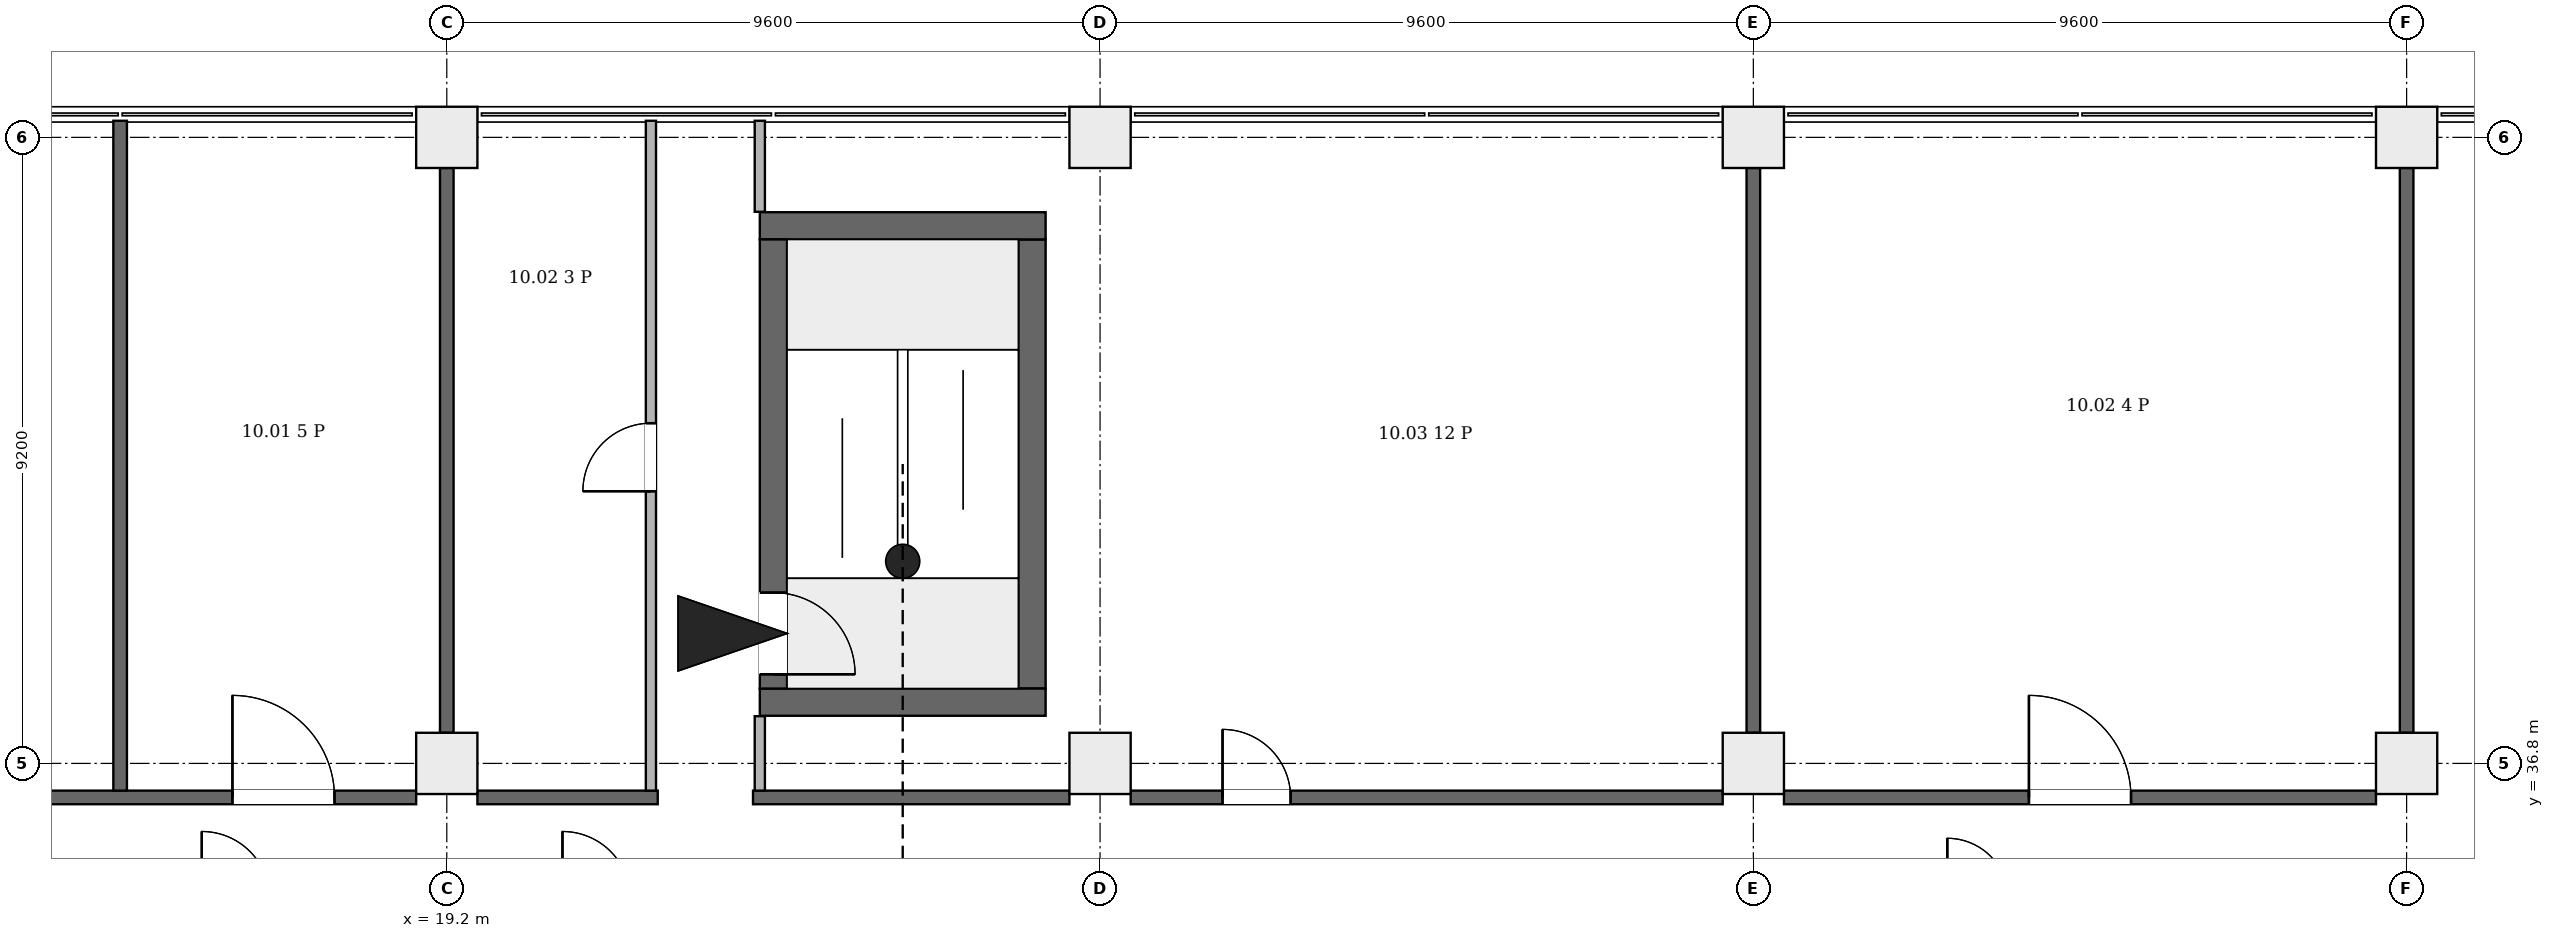
"""IFC4 building model, lengths in metres.
Left out: names, types, materials, properties, quantities, classifications, styles, units other than length and angle.
Written with IfcOpenShell. Run it as: python <this file> out.ifc"""

import sys

from ifc_helpers import new_model, si_unit, direction, frame, frame_2d, origin, origin_2d, place, context, subcontext, project, spatial, rectangle, extrude, element, fill, save


model = new_model("IFC4")
c1 = context("Model", 3, precision=1e-05, world=origin(), true_north=direction((0.0, 1.0)))
c2 = subcontext(c1, "Body", "Model", "MODEL_VIEW")
j1 = project(units=[si_unit("LENGTHUNIT", "METRE"), si_unit("PLANEANGLEUNIT", "RADIAN")], contexts=[c1])
p1 = place(None, origin())
s1 = spatial("IfcSite", under=j1, at=p1, CompositionType="ELEMENT")
p2 = place(p1, origin())
s2 = spatial("IfcBuilding", under=s1, at=p2, CompositionType="ELEMENT")
p3 = place(p2, frame((0.0, 0.0, 52.9)))
s3 = spatial("IfcBuildingStorey", under=s2, at=p3, CompositionType="ELEMENT", Elevation=52.9)
for number, where, z_axis, x_axis in (
    (1, (23.8, 37.7, 0.0), (0.0, 0.0, 1.0), (1.0, 0.0, 0.0)),
    (2, (23.8, 44.7, 0.0), (0.0, 0.0, 1.0), (1.0, 0.0, 0.0)),
):
    element("IfcWall", number, at=place(p3, frame(where, z_axis=z_axis, x_axis=x_axis)), inside=s3, PredefinedType="SHEAR", context=c2, shape_type="SweptSolid", body=[
        extrude(rectangle(XDim=4.2, YDim=0.4, at=frame_2d((2.1, 0.0))), origin(), (0.0, 0.0, 1.0), 4.2),
    ])
p4 = place(p3, frame((24.0, 37.9, 0.0), z_axis=(0.0, 0.0, 1.0), x_axis=(0.0, 1.0, 0.0)))
e3 = element("IfcWall", 3, at=p4, inside=s3, PredefinedType="SHEAR", context=c2, shape_type="SweptSolid", body=[
    extrude(rectangle(XDim=6.6, YDim=0.4, at=frame_2d((3.3, 0.0))), origin(), (0.0, 0.0, 1.0), 4.2),
])
p5 = place(p4, frame((0.21, 0.0, 0.0)))
e4 = element("IfcOpeningElement", 4, at=p5, cuts=e3, PredefinedType="OPENING", context=c2, shape_type="SweptSolid", body=[
    extrude(rectangle(XDim=1.2, YDim=2.1, at=frame_2d((0.6, 1.05))), frame((0.0, 0.21, 0.0), z_axis=(0.0, -1.0, 0.0), x_axis=(1.0, 0.0, 0.0)), (0.0, 0.0, 1.0), 0.42),
])
p6 = place(p3, frame((27.8, 37.9, 0.0), z_axis=(0.0, 0.0, 1.0), x_axis=(0.0, 1.0, 0.0)))
e5 = element("IfcWall", 5, at=p6, inside=s3, PredefinedType="SHEAR", context=c2, shape_type="SweptSolid", body=[
    extrude(rectangle(XDim=6.6, YDim=0.4, at=frame_2d((3.3, 0.0))), origin(), (0.0, 0.0, 1.0), 4.2),
])
for number, where, z_axis, x_axis in (
    (6, (19.2, 36.8, 0.0), (0.0, 0.0, 1.0), (1.0, 0.0, 0.0)),
    (7, (28.8, 36.8, 0.0), (0.0, 0.0, 1.0), (1.0, 0.0, 0.0)),
    (8, (38.4, 36.8, 0.0), (0.0, 0.0, 1.0), (1.0, 0.0, 0.0)),
    (9, (48.0, 36.8, 0.0), (0.0, 0.0, 1.0), (1.0, 0.0, 0.0)),
    (10, (19.2, 46.0, 0.0), (0.0, 0.0, 1.0), (1.0, 0.0, 0.0)),
    (11, (28.8, 46.0, 0.0), (0.0, 0.0, 1.0), (1.0, 0.0, 0.0)),
    (12, (38.4, 46.0, 0.0), (0.0, 0.0, 1.0), (1.0, 0.0, 0.0)),
    (13, (48.0, 46.0, 0.0), (0.0, 0.0, 1.0), (1.0, 0.0, 0.0)),
):
    element("IfcColumn", number, at=place(p3, frame(where, z_axis=z_axis, x_axis=x_axis)), inside=s3, PredefinedType="COLUMN", context=c2, shape_type="SweptSolid", body=[
        extrude(rectangle(XDim=0.9, YDim=0.9, at=origin_2d()), origin(), (0.0, 0.0, 1.0), 4.2),
    ])
p7 = place(p3, frame((11.2, 36.3, 0.0), z_axis=(0.0, 0.0, 1.0), x_axis=(1.0, 0.0, 0.0)))
e14 = element("IfcWall", 14, at=p7, inside=s3, PredefinedType="PARTITIONING", context=c2, shape_type="SweptSolid", body=[
    extrude(rectangle(XDim=7.55, YDim=0.2, at=frame_2d((3.775, 0.0))), origin(), (0.0, 0.0, 1.0), 3.9),
])
p8 = place(p7, frame((4.85, 0.0, 0.0)))
e15 = element("IfcOpeningElement", 15, at=p8, cuts=e14, PredefinedType="OPENING", context=c2, shape_type="SweptSolid", body=[
    extrude(rectangle(XDim=1.5, YDim=2.1, at=frame_2d((0.75, 1.05))), frame((0.0, 0.11, 0.0), z_axis=(0.0, -1.0, 0.0), x_axis=(1.0, 0.0, 0.0)), (0.0, 0.0, 1.0), 0.22),
])
p9 = place(p3, frame((14.4, 36.4, 0.0), z_axis=(0.0, 0.0, 1.0), x_axis=(0.0, 1.0, 0.0)))
e16 = element("IfcWall", 16, at=p9, inside=s3, PredefinedType="PARTITIONING", context=c2, shape_type="SweptSolid", body=[
    extrude(rectangle(XDim=9.844, YDim=0.2, at=frame_2d((4.922, 0.0))), origin(), (0.0, 0.0, 1.0), 3.9),
])
p10 = place(p3, frame((19.2, 37.25, 0.0), z_axis=(0.0, 0.0, 1.0), x_axis=(0.0, 1.0, 0.0)))
e17 = element("IfcWall", 17, at=p10, inside=s3, PredefinedType="PARTITIONING", context=c2, shape_type="SweptSolid", body=[
    extrude(rectangle(XDim=8.3, YDim=0.2, at=frame_2d((4.15, 0.0))), origin(), (0.0, 0.0, 1.0), 3.9),
])
p11 = place(p3, frame((19.65, 36.3, 0.0), z_axis=(0.0, 0.0, 1.0), x_axis=(1.0, 0.0, 0.0)))
e18 = element("IfcWall", 18, at=p11, inside=s3, PredefinedType="PARTITIONING", context=c2, shape_type="SweptSolid", body=[
    extrude(rectangle(XDim=2.65, YDim=0.2, at=frame_2d((1.325, 0.0))), origin(), (0.0, 0.0, 1.0), 3.9),
])
p12 = place(p3, frame((22.2, 36.4, 0.0), z_axis=(0.0, 0.0, 1.0), x_axis=(0.0, 1.0, 0.0)))
e19 = element("IfcWall", 19, at=p12, inside=s3, PredefinedType="PARTITIONING", context=c2, shape_type="SweptSolid", body=[
    extrude(rectangle(XDim=9.844, YDim=0.15, at=frame_2d((4.922, 0.0))), origin(), (0.0, 0.0, 1.0), 3.9),
])
p13 = place(p12, frame((4.4, 0.0, 0.0)))
e20 = element("IfcOpeningElement", 20, at=p13, cuts=e19, PredefinedType="OPENING", context=c2, shape_type="SweptSolid", body=[
    extrude(rectangle(XDim=1.0, YDim=2.1, at=frame_2d((0.5, 1.05))), frame((0.0, 0.085, 0.0), z_axis=(0.0, -1.0, 0.0), x_axis=(1.0, 0.0, 0.0)), (0.0, 0.0, 1.0), 0.17),
])
p14 = place(p3, frame((23.7, 36.3, 0.0), z_axis=(0.0, 0.0, 1.0), x_axis=(1.0, 0.0, 0.0)))
e21 = element("IfcWall", 21, at=p14, inside=s3, PredefinedType="PARTITIONING", context=c2, shape_type="SweptSolid", body=[
    extrude(rectangle(XDim=4.65, YDim=0.2, at=frame_2d((2.325, 0.0))), origin(), (0.0, 0.0, 1.0), 3.9),
])
p15 = place(p3, frame((23.8, 36.4, 0.0), z_axis=(0.0, 0.0, 1.0), x_axis=(0.0, 1.0, 0.0)))
e22 = element("IfcWall", 22, at=p15, inside=s3, PredefinedType="PARTITIONING", context=c2, shape_type="SweptSolid", body=[
    extrude(rectangle(XDim=1.094, YDim=0.15, at=frame_2d((0.547, 0.0))), origin(), (0.0, 0.0, 1.0), 3.9),
])
p16 = place(p3, frame((23.8, 44.906, 0.0), z_axis=(0.0, 0.0, 1.0), x_axis=(0.0, 1.0, 0.0)))
e23 = element("IfcWall", 23, at=p16, inside=s3, PredefinedType="PARTITIONING", context=c2, shape_type="SweptSolid", body=[
    extrude(rectangle(XDim=1.338, YDim=0.15, at=frame_2d((0.669, 0.0))), origin(), (0.0, 0.0, 1.0), 3.9),
])
p17 = place(p3, frame((29.25, 36.3, 0.0), z_axis=(0.0, 0.0, 1.0), x_axis=(1.0, 0.0, 0.0)))
e24 = element("IfcWall", 24, at=p17, inside=s3, PredefinedType="PARTITIONING", context=c2, shape_type="SweptSolid", body=[
    extrude(rectangle(XDim=8.7, YDim=0.2, at=frame_2d((4.35, 0.0))), origin(), (0.0, 0.0, 1.0), 3.9),
])
p18 = place(p17, frame((1.35, 0.0, 0.0)))
e25 = element("IfcOpeningElement", 25, at=p18, cuts=e24, PredefinedType="OPENING", context=c2, shape_type="SweptSolid", body=[
    extrude(rectangle(XDim=1.0, YDim=2.1, at=frame_2d((0.5, 1.05))), frame((0.0, 0.11, 0.0), z_axis=(0.0, -1.0, 0.0), x_axis=(1.0, 0.0, 0.0)), (0.0, 0.0, 1.0), 0.22),
])
p19 = place(p3, frame((38.4, 37.25, 0.0), z_axis=(0.0, 0.0, 1.0), x_axis=(0.0, 1.0, 0.0)))
e26 = element("IfcWall", 26, at=p19, inside=s3, PredefinedType="PARTITIONING", context=c2, shape_type="SweptSolid", body=[
    extrude(rectangle(XDim=8.3, YDim=0.2, at=frame_2d((4.15, 0.0))), origin(), (0.0, 0.0, 1.0), 3.9),
])
p20 = place(p3, frame((38.85, 36.3, 0.0), z_axis=(0.0, 0.0, 1.0), x_axis=(1.0, 0.0, 0.0)))
e27 = element("IfcWall", 27, at=p20, inside=s3, PredefinedType="PARTITIONING", context=c2, shape_type="SweptSolid", body=[
    extrude(rectangle(XDim=8.7, YDim=0.2, at=frame_2d((4.35, 0.0))), origin(), (0.0, 0.0, 1.0), 3.9),
])
p21 = place(p20, frame((3.6, 0.0, 0.0)))
e28 = element("IfcOpeningElement", 28, at=p21, cuts=e27, PredefinedType="OPENING", context=c2, shape_type="SweptSolid", body=[
    extrude(rectangle(XDim=1.5, YDim=2.1, at=frame_2d((0.75, 1.05))), frame((0.0, 0.11, 0.0), z_axis=(0.0, -1.0, 0.0), x_axis=(1.0, 0.0, 0.0)), (0.0, 0.0, 1.0), 0.22),
])
p22 = place(p3, frame((48.0, 37.25, 0.0), z_axis=(0.0, 0.0, 1.0), x_axis=(0.0, 1.0, 0.0)))
e29 = element("IfcWall", 29, at=p22, inside=s3, PredefinedType="PARTITIONING", context=c2, shape_type="SweptSolid", body=[
    extrude(rectangle(XDim=8.3, YDim=0.2, at=frame_2d((4.15, 0.0))), origin(), (0.0, 0.0, 1.0), 3.3),
])
p23 = place(p5, origin())
e30 = element("IfcDoor", 30, at=p23, inside=s3, OperationType="SINGLE_SWING_LEFT", PredefinedType="DOOR", context=c2, shape_type="SweptSolid", body=[
    extrude(rectangle(XDim=1.2, YDim=2.1, at=frame_2d((0.6, 1.05))), frame((0.0, 0.025, 0.0), z_axis=(0.0, -1.0, 0.0), x_axis=(1.0, 0.0, 0.0)), (0.0, 0.0, 1.0), 0.05),
])
fill(e4, e30)
p24 = place(p8, origin())
e31 = element("IfcDoor", 31, at=p24, inside=s3, OperationType="DOUBLE_DOOR_SINGLE_SWING", PredefinedType="DOOR", context=c2, shape_type="SweptSolid", body=[
    extrude(rectangle(XDim=1.5, YDim=2.1, at=frame_2d((0.75, 1.05))), frame((0.0, 0.025, 0.0), z_axis=(0.0, -1.0, 0.0), x_axis=(1.0, 0.0, 0.0)), (0.0, 0.0, 1.0), 0.05),
])
fill(e15, e31)
p25 = place(p13, origin())
e32 = element("IfcDoor", 32, at=p25, inside=s3, OperationType="SINGLE_SWING_RIGHT", PredefinedType="DOOR", context=c2, shape_type="SweptSolid", body=[
    extrude(rectangle(XDim=1.0, YDim=2.1, at=frame_2d((0.5, 1.05))), frame((0.0, 0.025, 0.0), z_axis=(0.0, -1.0, 0.0), x_axis=(1.0, 0.0, 0.0)), (0.0, 0.0, 1.0), 0.05),
])
fill(e20, e32)
p26 = place(p18, origin())
e33 = element("IfcDoor", 33, at=p26, inside=s3, OperationType="SINGLE_SWING_LEFT", PredefinedType="DOOR", context=c2, shape_type="SweptSolid", body=[
    extrude(rectangle(XDim=1.0, YDim=2.1, at=frame_2d((0.5, 1.05))), frame((0.0, 0.025, 0.0), z_axis=(0.0, -1.0, 0.0), x_axis=(1.0, 0.0, 0.0)), (0.0, 0.0, 1.0), 0.05),
])
fill(e25, e33)
p27 = place(p21, origin())
e34 = element("IfcDoor", 34, at=p27, inside=s3, OperationType="DOUBLE_DOOR_SINGLE_SWING", PredefinedType="DOOR", context=c2, shape_type="SweptSolid", body=[
    extrude(rectangle(XDim=1.5, YDim=2.1, at=frame_2d((0.75, 1.05))), frame((0.0, 0.025, 0.0), z_axis=(0.0, -1.0, 0.0), x_axis=(1.0, 0.0, 0.0)), (0.0, 0.0, 1.0), 0.05),
])
fill(e28, e34)
save(model, sys.argv[1])
